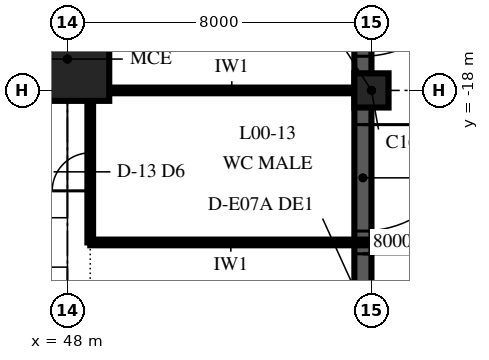
"""IFC4 building model, lengths in metres.
Left out: names, types, materials, properties, quantities, classifications, styles, units other than length and angle.
Written with IfcOpenShell. Run it as: python <this file> out.ifc"""

import sys

from ifc_helpers import new_model, si_unit, direction, frame, frame_2d, origin, origin_2d, place, context, subcontext, project, spatial, rectangle, extrude, element, fill, save


model = new_model("IFC4")
c1 = context("Model", 3, precision=1e-05, world=origin(), true_north=direction((0.0, 1.0)))
c2 = subcontext(c1, "Body", "Model", "MODEL_VIEW")
j1 = project(units=[si_unit("LENGTHUNIT", "METRE"), si_unit("PLANEANGLEUNIT", "RADIAN")], contexts=[c1])
p1 = place(None, origin())
s1 = spatial("IfcSite", under=j1, at=p1, CompositionType="ELEMENT")
p2 = place(p1, origin())
s2 = spatial("IfcBuilding", under=s1, at=p2, CompositionType="ELEMENT")
p3 = place(p2, origin())
s3 = spatial("IfcBuildingStorey", under=s2, at=p3, CompositionType="ELEMENT", Elevation=0.0)
p4 = place(p3, frame((56.0, -18.0, 0.0), z_axis=(0.0, 0.0, 1.0), x_axis=(1.0, 0.0, 0.0)))
e1 = element("IfcColumn", 1, at=p4, inside=s3, PredefinedType="COLUMN", context=c2, shape_type="SweptSolid", body=[
    extrude(rectangle(XDim=0.9, YDim=0.9, at=origin_2d()), origin(), (0.0, 0.0, 1.0), 6.0),
])
p5 = place(p3, frame((48.0, -17.175, 0.0), z_axis=(0.0, 0.0, 1.0), x_axis=(1.0, 0.0, 0.0)))
e2 = element("IfcColumn", 2, at=p5, inside=s3, PredefinedType="COLUMN", context=c2, shape_type="SweptSolid", body=[
    extrude(rectangle(XDim=2.2, YDim=2.2, at=origin_2d()), origin(), (0.0, 0.0, 1.0), 6.0),
])
p6 = place(p3, frame((55.775, -73.55, 0.0), z_axis=(0.0, 0.0, 1.0), x_axis=(0.0, 1.0, 0.0)))
e3 = element("IfcWall", 3, at=p6, inside=s3, PredefinedType="SOLIDWALL", context=c2, shape_type="SweptSolid", body=[
    extrude(rectangle(XDim=119.1, YDim=0.45, at=frame_2d((59.55, 0.0))), origin(), (0.0, 0.0, 1.0), 6.0),
])
p7 = place(p6, frame((0.675, 0.0, 0.0)))
e4 = element("IfcOpeningElement", 4, at=p7, cuts=e3, PredefinedType="OPENING", context=c2, shape_type="SweptSolid", body=[
    extrude(rectangle(XDim=2.8, YDim=2.4, at=frame_2d((1.4, 1.2))), frame((0.0, 0.24, 0.0), z_axis=(0.0, -1.0, 0.0), x_axis=(1.0, 0.0, 0.0)), (0.0, 0.0, 1.0), 0.48),
])
p8 = place(p6, frame((4.075, 0.0, 0.0)))
e5 = element("IfcOpeningElement", 5, at=p8, cuts=e3, PredefinedType="OPENING", context=c2, shape_type="SweptSolid", body=[
    extrude(rectangle(XDim=2.8, YDim=2.4, at=frame_2d((1.4, 1.2))), frame((0.0, 0.24, 0.0), z_axis=(0.0, -1.0, 0.0), x_axis=(1.0, 0.0, 0.0)), (0.0, 0.0, 1.0), 0.48),
])
p9 = place(p6, frame((8.45, 0.0, 0.0)))
e6 = element("IfcOpeningElement", 6, at=p9, cuts=e3, PredefinedType="OPENING", context=c2, shape_type="SweptSolid", body=[
    extrude(rectangle(XDim=2.8, YDim=2.4, at=frame_2d((1.4, 1.2))), frame((0.0, 0.24, 0.0), z_axis=(0.0, -1.0, 0.0), x_axis=(1.0, 0.0, 0.0)), (0.0, 0.0, 1.0), 0.48),
])
p10 = place(p6, frame((11.85, 0.0, 0.0)))
e7 = element("IfcOpeningElement", 7, at=p10, cuts=e3, PredefinedType="OPENING", context=c2, shape_type="SweptSolid", body=[
    extrude(rectangle(XDim=2.8, YDim=2.4, at=frame_2d((1.4, 1.2))), frame((0.0, 0.24, 0.0), z_axis=(0.0, -1.0, 0.0), x_axis=(1.0, 0.0, 0.0)), (0.0, 0.0, 1.0), 0.48),
])
p11 = place(p6, frame((16.45, 0.0, 0.0)))
e8 = element("IfcOpeningElement", 8, at=p11, cuts=e3, PredefinedType="OPENING", context=c2, shape_type="SweptSolid", body=[
    extrude(rectangle(XDim=2.8, YDim=2.4, at=frame_2d((1.4, 1.2))), frame((0.0, 0.24, 0.0), z_axis=(0.0, -1.0, 0.0), x_axis=(1.0, 0.0, 0.0)), (0.0, 0.0, 1.0), 0.48),
])
p12 = place(p6, frame((19.85, 0.0, 0.0)))
e9 = element("IfcOpeningElement", 9, at=p12, cuts=e3, PredefinedType="OPENING", context=c2, shape_type="SweptSolid", body=[
    extrude(rectangle(XDim=2.8, YDim=2.4, at=frame_2d((1.4, 1.2))), frame((0.0, 0.24, 0.0), z_axis=(0.0, -1.0, 0.0), x_axis=(1.0, 0.0, 0.0)), (0.0, 0.0, 1.0), 0.48),
])
p13 = place(p6, frame((24.45, 0.0, 0.0)))
e10 = element("IfcOpeningElement", 10, at=p13, cuts=e3, PredefinedType="OPENING", context=c2, shape_type="SweptSolid", body=[
    extrude(rectangle(XDim=2.8, YDim=2.4, at=frame_2d((1.4, 1.2))), frame((0.0, 0.24, 0.0), z_axis=(0.0, -1.0, 0.0), x_axis=(1.0, 0.0, 0.0)), (0.0, 0.0, 1.0), 0.48),
])
p14 = place(p6, frame((27.85, 0.0, 0.0)))
e11 = element("IfcOpeningElement", 11, at=p14, cuts=e3, PredefinedType="OPENING", context=c2, shape_type="SweptSolid", body=[
    extrude(rectangle(XDim=2.8, YDim=2.4, at=frame_2d((1.4, 1.2))), frame((0.0, 0.24, 0.0), z_axis=(0.0, -1.0, 0.0), x_axis=(1.0, 0.0, 0.0)), (0.0, 0.0, 1.0), 0.48),
])
p15 = place(p6, frame((32.45, 0.0, 0.0)))
e12 = element("IfcOpeningElement", 12, at=p15, cuts=e3, PredefinedType="OPENING", context=c2, shape_type="SweptSolid", body=[
    extrude(rectangle(XDim=2.8, YDim=2.4, at=frame_2d((1.4, 1.2))), frame((0.0, 0.24, 0.0), z_axis=(0.0, -1.0, 0.0), x_axis=(1.0, 0.0, 0.0)), (0.0, 0.0, 1.0), 0.48),
])
p16 = place(p6, frame((35.85, 0.0, 0.0)))
e13 = element("IfcOpeningElement", 13, at=p16, cuts=e3, PredefinedType="OPENING", context=c2, shape_type="SweptSolid", body=[
    extrude(rectangle(XDim=2.8, YDim=2.4, at=frame_2d((1.4, 1.2))), frame((0.0, 0.24, 0.0), z_axis=(0.0, -1.0, 0.0), x_axis=(1.0, 0.0, 0.0)), (0.0, 0.0, 1.0), 0.48),
])
p17 = place(p6, frame((43.425, 0.0, 0.0)))
e14 = element("IfcOpeningElement", 14, at=p17, cuts=e3, PredefinedType="OPENING", context=c2, shape_type="SweptSolid", body=[
    extrude(rectangle(XDim=2.8, YDim=2.4, at=frame_2d((1.4, 1.2))), frame((0.0, 0.24, 0.0), z_axis=(0.0, -1.0, 0.0), x_axis=(1.0, 0.0, 0.0)), (0.0, 0.0, 1.0), 0.48),
])
p18 = place(p6, frame((48.45, 0.0, 0.0)))
e15 = element("IfcOpeningElement", 15, at=p18, cuts=e3, PredefinedType="OPENING", context=c2, shape_type="SweptSolid", body=[
    extrude(rectangle(XDim=2.8, YDim=2.4, at=frame_2d((1.4, 1.2))), frame((0.0, 0.24, 0.0), z_axis=(0.0, -1.0, 0.0), x_axis=(1.0, 0.0, 0.0)), (0.0, 0.0, 1.0), 0.48),
])
p19 = place(p6, frame((51.85, 0.0, 0.0)))
e16 = element("IfcOpeningElement", 16, at=p19, cuts=e3, PredefinedType="OPENING", context=c2, shape_type="SweptSolid", body=[
    extrude(rectangle(XDim=2.8, YDim=2.4, at=frame_2d((1.4, 1.2))), frame((0.0, 0.24, 0.0), z_axis=(0.0, -1.0, 0.0), x_axis=(1.0, 0.0, 0.0)), (0.0, 0.0, 1.0), 0.48),
])
p20 = place(p6, frame((56.45, 0.0, 0.0)))
e17 = element("IfcOpeningElement", 17, at=p20, cuts=e3, PredefinedType="OPENING", context=c2, shape_type="SweptSolid", body=[
    extrude(rectangle(XDim=2.8, YDim=2.4, at=frame_2d((1.4, 1.2))), frame((0.0, 0.24, 0.0), z_axis=(0.0, -1.0, 0.0), x_axis=(1.0, 0.0, 0.0)), (0.0, 0.0, 1.0), 0.48),
])
p21 = place(p6, frame((59.85, 0.0, 0.0)))
e18 = element("IfcOpeningElement", 18, at=p21, cuts=e3, PredefinedType="OPENING", context=c2, shape_type="SweptSolid", body=[
    extrude(rectangle(XDim=2.8, YDim=2.4, at=frame_2d((1.4, 1.2))), frame((0.0, 0.24, 0.0), z_axis=(0.0, -1.0, 0.0), x_axis=(1.0, 0.0, 0.0)), (0.0, 0.0, 1.0), 0.48),
])
p22 = place(p6, frame((64.45, 0.0, 0.0)))
e19 = element("IfcOpeningElement", 19, at=p22, cuts=e3, PredefinedType="OPENING", context=c2, shape_type="SweptSolid", body=[
    extrude(rectangle(XDim=2.8, YDim=2.4, at=frame_2d((1.4, 1.2))), frame((0.0, 0.24, 0.0), z_axis=(0.0, -1.0, 0.0), x_axis=(1.0, 0.0, 0.0)), (0.0, 0.0, 1.0), 0.48),
])
p23 = place(p6, frame((67.85, 0.0, 0.0)))
e20 = element("IfcOpeningElement", 20, at=p23, cuts=e3, PredefinedType="OPENING", context=c2, shape_type="SweptSolid", body=[
    extrude(rectangle(XDim=2.8, YDim=2.4, at=frame_2d((1.4, 1.2))), frame((0.0, 0.24, 0.0), z_axis=(0.0, -1.0, 0.0), x_axis=(1.0, 0.0, 0.0)), (0.0, 0.0, 1.0), 0.48),
])
p24 = place(p6, frame((72.45, 0.0, 0.0)))
e21 = element("IfcOpeningElement", 21, at=p24, cuts=e3, PredefinedType="OPENING", context=c2, shape_type="SweptSolid", body=[
    extrude(rectangle(XDim=2.8, YDim=2.4, at=frame_2d((1.4, 1.2))), frame((0.0, 0.24, 0.0), z_axis=(0.0, -1.0, 0.0), x_axis=(1.0, 0.0, 0.0)), (0.0, 0.0, 1.0), 0.48),
])
p25 = place(p6, frame((75.85, 0.0, 0.0)))
e22 = element("IfcOpeningElement", 22, at=p25, cuts=e3, PredefinedType="OPENING", context=c2, shape_type="SweptSolid", body=[
    extrude(rectangle(XDim=2.8, YDim=2.4, at=frame_2d((1.4, 1.2))), frame((0.0, 0.24, 0.0), z_axis=(0.0, -1.0, 0.0), x_axis=(1.0, 0.0, 0.0)), (0.0, 0.0, 1.0), 0.48),
])
p26 = place(p6, frame((80.45, 0.0, 0.0)))
e23 = element("IfcOpeningElement", 23, at=p26, cuts=e3, PredefinedType="OPENING", context=c2, shape_type="SweptSolid", body=[
    extrude(rectangle(XDim=2.8, YDim=2.4, at=frame_2d((1.4, 1.2))), frame((0.0, 0.24, 0.0), z_axis=(0.0, -1.0, 0.0), x_axis=(1.0, 0.0, 0.0)), (0.0, 0.0, 1.0), 0.48),
])
p27 = place(p6, frame((83.85, 0.0, 0.0)))
e24 = element("IfcOpeningElement", 24, at=p27, cuts=e3, PredefinedType="OPENING", context=c2, shape_type="SweptSolid", body=[
    extrude(rectangle(XDim=2.8, YDim=2.4, at=frame_2d((1.4, 1.2))), frame((0.0, 0.24, 0.0), z_axis=(0.0, -1.0, 0.0), x_axis=(1.0, 0.0, 0.0)), (0.0, 0.0, 1.0), 0.48),
])
p28 = place(p6, frame((88.45, 0.0, 0.0)))
e25 = element("IfcOpeningElement", 25, at=p28, cuts=e3, PredefinedType="OPENING", context=c2, shape_type="SweptSolid", body=[
    extrude(rectangle(XDim=2.8, YDim=2.4, at=frame_2d((1.4, 1.2))), frame((0.0, 0.24, 0.0), z_axis=(0.0, -1.0, 0.0), x_axis=(1.0, 0.0, 0.0)), (0.0, 0.0, 1.0), 0.48),
])
p29 = place(p6, frame((91.85, 0.0, 0.0)))
e26 = element("IfcOpeningElement", 26, at=p29, cuts=e3, PredefinedType="OPENING", context=c2, shape_type="SweptSolid", body=[
    extrude(rectangle(XDim=2.8, YDim=2.4, at=frame_2d((1.4, 1.2))), frame((0.0, 0.24, 0.0), z_axis=(0.0, -1.0, 0.0), x_axis=(1.0, 0.0, 0.0)), (0.0, 0.0, 1.0), 0.48),
])
p30 = place(p6, frame((96.45, 0.0, 0.0)))
e27 = element("IfcOpeningElement", 27, at=p30, cuts=e3, PredefinedType="OPENING", context=c2, shape_type="SweptSolid", body=[
    extrude(rectangle(XDim=2.8, YDim=2.4, at=frame_2d((1.4, 1.2))), frame((0.0, 0.24, 0.0), z_axis=(0.0, -1.0, 0.0), x_axis=(1.0, 0.0, 0.0)), (0.0, 0.0, 1.0), 0.48),
])
p31 = place(p6, frame((99.85, 0.0, 0.0)))
e28 = element("IfcOpeningElement", 28, at=p31, cuts=e3, PredefinedType="OPENING", context=c2, shape_type="SweptSolid", body=[
    extrude(rectangle(XDim=2.8, YDim=2.4, at=frame_2d((1.4, 1.2))), frame((0.0, 0.24, 0.0), z_axis=(0.0, -1.0, 0.0), x_axis=(1.0, 0.0, 0.0)), (0.0, 0.0, 1.0), 0.48),
])
p32 = place(p6, frame((104.45, 0.0, 0.0)))
e29 = element("IfcOpeningElement", 29, at=p32, cuts=e3, PredefinedType="OPENING", context=c2, shape_type="SweptSolid", body=[
    extrude(rectangle(XDim=2.8, YDim=2.4, at=frame_2d((1.4, 1.2))), frame((0.0, 0.24, 0.0), z_axis=(0.0, -1.0, 0.0), x_axis=(1.0, 0.0, 0.0)), (0.0, 0.0, 1.0), 0.48),
])
p33 = place(p6, frame((107.85, 0.0, 0.0)))
e30 = element("IfcOpeningElement", 30, at=p33, cuts=e3, PredefinedType="OPENING", context=c2, shape_type="SweptSolid", body=[
    extrude(rectangle(XDim=2.8, YDim=2.4, at=frame_2d((1.4, 1.2))), frame((0.0, 0.24, 0.0), z_axis=(0.0, -1.0, 0.0), x_axis=(1.0, 0.0, 0.0)), (0.0, 0.0, 1.0), 0.48),
])
p34 = place(p6, frame((112.225, 0.0, 0.0)))
e31 = element("IfcOpeningElement", 31, at=p34, cuts=e3, PredefinedType="OPENING", context=c2, shape_type="SweptSolid", body=[
    extrude(rectangle(XDim=2.8, YDim=2.4, at=frame_2d((1.4, 1.2))), frame((0.0, 0.24, 0.0), z_axis=(0.0, -1.0, 0.0), x_axis=(1.0, 0.0, 0.0)), (0.0, 0.0, 1.0), 0.48),
])
p35 = place(p6, frame((115.625, 0.0, 0.0)))
e32 = element("IfcOpeningElement", 32, at=p35, cuts=e3, PredefinedType="OPENING", context=c2, shape_type="SweptSolid", body=[
    extrude(rectangle(XDim=2.8, YDim=2.4, at=frame_2d((1.4, 1.2))), frame((0.0, 0.24, 0.0), z_axis=(0.0, -1.0, 0.0), x_axis=(1.0, 0.0, 0.0)), (0.0, 0.0, 1.0), 0.48),
])
p36 = place(p3, frame((48.6, -22.0, 0.0), z_axis=(0.0, 0.0, 1.0), x_axis=(0.0, 1.0, 0.0)))
e33 = element("IfcWall", 33, at=p36, inside=s3, PredefinedType="PARTITIONING", context=c2, shape_type="SweptSolid", body=[
    extrude(rectangle(XDim=3.715, YDim=0.15, at=frame_2d((1.857, 0.0))), origin(), (0.0, 0.0, 1.0), 5.7),
])
p37 = place(p36, frame((1.357, 0.0, 0.0)))
e34 = element("IfcOpeningElement", 34, at=p37, cuts=e33, PredefinedType="OPENING", context=c2, shape_type="SweptSolid", body=[
    extrude(rectangle(XDim=1.0, YDim=2.1, at=frame_2d((0.5, 1.05))), frame((0.0, 0.09, 0.0), z_axis=(0.0, -1.0, 0.0), x_axis=(1.0, 0.0, 0.0)), (0.0, 0.0, 1.0), 0.18),
])
p38 = place(p3, frame((48.6, -22.0, 0.0), z_axis=(0.0, 0.0, 1.0), x_axis=(1.0, 0.0, 0.0)))
e35 = element("IfcWall", 35, at=p38, inside=s3, PredefinedType="PARTITIONING", context=c2, shape_type="SweptSolid", body=[
    extrude(rectangle(XDim=7.4, YDim=0.15, at=frame_2d((3.7, 0.0))), origin(), (0.0, 0.0, 1.0), 5.7),
])
p39 = place(p3, frame((49.11, -18.0, 0.0), z_axis=(0.0, 0.0, 1.0), x_axis=(1.0, 0.0, 0.0)))
e36 = element("IfcWall", 36, at=p39, inside=s3, PredefinedType="PARTITIONING", context=c2, shape_type="SweptSolid", body=[
    extrude(rectangle(XDim=6.43, YDim=0.15, at=frame_2d((3.215, 0.0))), origin(), (0.0, 0.0, 1.0), 5.7),
])
p40 = place(p18, frame((2.8, 0.0, 0.0), z_axis=(0.0, 0.0, 1.0), x_axis=(-1.0, 0.0, 0.0)))
e37 = element("IfcDoor", 37, at=p40, inside=s3, OperationType="DOUBLE_DOOR_SINGLE_SWING", PredefinedType="DOOR", context=c2, shape_type="SweptSolid", body=[
    extrude(rectangle(XDim=2.8, YDim=2.4, at=frame_2d((1.4, 1.2))), frame((0.0, 0.225, 0.0), z_axis=(0.0, -1.0, 0.0), x_axis=(1.0, 0.0, 0.0)), (0.0, 0.0, 1.0), 0.449),
])
fill(e15, e37)
p41 = place(p19, frame((2.8, 0.0, 0.0), z_axis=(0.0, 0.0, 1.0), x_axis=(-1.0, 0.0, 0.0)))
e38 = element("IfcDoor", 38, at=p41, inside=s3, OperationType="DOUBLE_DOOR_SINGLE_SWING", PredefinedType="DOOR", context=c2, shape_type="SweptSolid", body=[
    extrude(rectangle(XDim=2.8, YDim=2.4, at=frame_2d((1.4, 1.2))), frame((0.0, 0.225, 0.0), z_axis=(0.0, -1.0, 0.0), x_axis=(1.0, 0.0, 0.0)), (0.0, 0.0, 1.0), 0.449),
])
fill(e16, e38)
p42 = place(p20, frame((2.8, 0.0, 0.0), z_axis=(0.0, 0.0, 1.0), x_axis=(-1.0, 0.0, 0.0)))
e39 = element("IfcDoor", 39, at=p42, inside=s3, OperationType="DOUBLE_DOOR_SINGLE_SWING", PredefinedType="DOOR", context=c2, shape_type="SweptSolid", body=[
    extrude(rectangle(XDim=2.8, YDim=2.4, at=frame_2d((1.4, 1.2))), frame((0.0, 0.225, 0.0), z_axis=(0.0, -1.0, 0.0), x_axis=(1.0, 0.0, 0.0)), (0.0, 0.0, 1.0), 0.449),
])
fill(e17, e39)
p43 = place(p37, origin())
e40 = element("IfcDoor", 40, at=p43, inside=s3, OperationType="SINGLE_SWING_LEFT", PredefinedType="DOOR", context=c2, shape_type="SweptSolid", body=[
    extrude(rectangle(XDim=1.0, YDim=2.1, at=frame_2d((0.5, 1.05))), frame((0.0, 0.075, 0.0), z_axis=(0.0, -1.0, 0.0), x_axis=(1.0, 0.0, 0.0)), (0.0, 0.0, 1.0), 0.149),
])
fill(e34, e40)
save(model, sys.argv[1])
